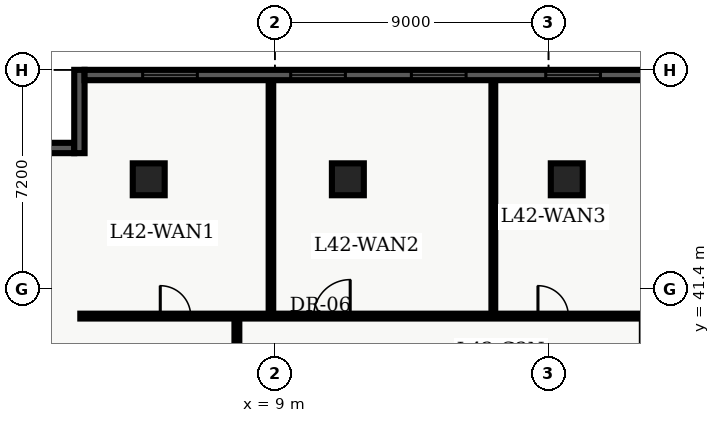
"""IFC4 building model, lengths in metres.
Left out: names, types, materials, properties, quantities, classifications, styles, units other than length and angle.
Written with IfcOpenShell. Run it as: python <this file> out.ifc"""

import sys

from ifc_helpers import new_model, entity, si_unit, converted_unit, direction, frame, origin_with_axes, origin_2d_with_axis, place, context, subcontext, project, spatial, polyline, rectangle, outline, extrude, element, fill, save


model = new_model("IFC4")
c1 = context("Model", 3, precision=1e-05, world=origin_with_axes(), true_north=direction((0.0, 1.0)))
c2 = subcontext(c1, "Body", "Model", "MODEL_VIEW")
j1 = project(units=[si_unit("LENGTHUNIT", "METRE"), converted_unit("PLANEANGLEUNIT", "DEGREE", entity("IfcPlaneAngleMeasure", 0.017), si_unit("PLANEANGLEUNIT", "RADIAN"), dimensions=[0, 0, 0, 0, 0, 0, 0])], contexts=[c1])
p1 = place(None, origin_with_axes())
s1 = spatial("IfcSite", under=j1, at=p1, CompositionType="ELEMENT")
p2 = place(p1, origin_with_axes())
s2 = spatial("IfcBuilding", under=s1, at=p2, CompositionType="ELEMENT")
p3 = place(p2, frame((0.0, 0.0, 171.9), z_axis=(0.0, 0.0, 1.0), x_axis=(1.0, 0.0, 0.0)))
s3 = spatial("IfcBuildingStorey", under=s2, at=p3, CompositionType="ELEMENT", Elevation=171.9)
for number, where, z_axis, x_axis in (
    (1, (11.4, 45.0, 0.0), (0.0, 0.0, 1.0), (1.0, 0.0, 0.0)),
    (2, (18.6, 45.0, 0.0), (0.0, 0.0, 1.0), (1.0, 0.0, 0.0)),
    (3, (4.85, 45.0, 0.0), (0.0, 0.0, 1.0), (1.0, 0.0, 0.0)),
):
    element("IfcColumn", number, at=place(p3, frame(where, z_axis=z_axis, x_axis=x_axis)), inside=s3, PredefinedType="COLUMN", context=c2, shape_type="SweptSolid", body=[
        extrude(rectangle(XDim=1.05, YDim=1.05, at=origin_2d_with_axis()), origin_with_axes(), (0.0, 0.0, 1.0), 3.9),
    ])
p4 = place(p3, frame((2.6, 40.5, 0.0), z_axis=(0.0, 0.0, 1.0), x_axis=(1.0, 0.0, 0.0)))
e4 = element("IfcWall", 4, at=p4, inside=s3, PredefinedType="PARTITIONING", context=c2, shape_type="SweptSolid", body=[
    extrude(outline(polyline([(0.0, -0.08), (21.803, -0.08), (21.803, 0.08), (0.0, 0.08), (0.0, -0.08)])), origin_with_axes(), (0.0, 0.0, 1.0), 2.7),
])
p5 = place(p4, frame((3.13, 0.0, 0.0), z_axis=(0.0, 0.0, 1.0), x_axis=(1.0, 0.0, 0.0)))
e5 = element("IfcOpeningElement", 5, at=p5, cuts=e4, PredefinedType="OPENING", context=c2, shape_type="SweptSolid", body=[
    extrude(rectangle(XDim=1.0, YDim=0.18, at=origin_2d_with_axis()), origin_with_axes(), (0.0, 0.0, 1.0), 2.15),
])
p6 = place(p4, frame((8.277, 0.0, 0.0), z_axis=(0.0, 0.0, 1.0), x_axis=(1.0, 0.0, 0.0)))
e6 = element("IfcOpeningElement", 6, at=p6, cuts=e4, PredefinedType="OPENING", context=c2, shape_type="SweptSolid", body=[
    extrude(rectangle(XDim=1.2, YDim=0.18, at=origin_2d_with_axis()), origin_with_axes(), (0.0, 0.0, 1.0), 2.2),
])
p7 = place(p4, frame((15.553, 0.0, 0.0), z_axis=(0.0, 0.0, 1.0), x_axis=(1.0, 0.0, 0.0)))
e7 = element("IfcOpeningElement", 7, at=p7, cuts=e4, PredefinedType="OPENING", context=c2, shape_type="SweptSolid", body=[
    extrude(rectangle(XDim=1.0, YDim=0.18, at=origin_2d_with_axis()), origin_with_axes(), (0.0, 0.0, 1.0), 2.15),
])
p8 = place(p3, frame((7.75, 7.8, 0.0), z_axis=(0.0, 0.0, 1.0), x_axis=(0.0, 1.0, 0.0)))
e8 = element("IfcWall", 8, at=p8, inside=s3, PredefinedType="PARTITIONING", context=c2, shape_type="SweptSolid", body=[
    extrude(outline(polyline([(0.0, -0.08), (32.7, -0.08), (32.7, 0.08), (0.0, 0.08), (0.0, -0.08)])), origin_with_axes(), (0.0, 0.0, 1.0), 2.7),
])
p9 = place(p8, frame((4.258, 0.0, 0.0), z_axis=(0.0, 0.0, 1.0), x_axis=(1.0, 0.0, 0.0)))
e9 = element("IfcOpeningElement", 9, at=p9, cuts=e8, PredefinedType="OPENING", context=c2, shape_type="SweptSolid", body=[
    extrude(rectangle(XDim=1.0, YDim=0.18, at=origin_2d_with_axis()), origin_with_axes(), (0.0, 0.0, 1.0), 2.15),
])
p10 = place(p8, frame((13.551, 0.0, 0.0), z_axis=(0.0, 0.0, 1.0), x_axis=(1.0, 0.0, 0.0)))
e10 = element("IfcOpeningElement", 10, at=p10, cuts=e8, PredefinedType="OPENING", context=c2, shape_type="SweptSolid", body=[
    extrude(rectangle(XDim=1.0, YDim=0.18, at=origin_2d_with_axis()), origin_with_axes(), (0.0, 0.0, 1.0), 2.15),
])
p11 = place(p8, frame((25.643, 0.0, 0.0), z_axis=(0.0, 0.0, 1.0), x_axis=(1.0, 0.0, 0.0)))
e11 = element("IfcOpeningElement", 11, at=p11, cuts=e8, PredefinedType="OPENING", context=c2, shape_type="SweptSolid", body=[
    extrude(rectangle(XDim=1.0, YDim=0.18, at=origin_2d_with_axis()), origin_with_axes(), (0.0, 0.0, 1.0), 2.15),
])
p12 = place(p3, frame((8.87, 40.6, 0.0), z_axis=(0.0, 0.0, 1.0), x_axis=(0.0, 1.0, 0.0)))
e12 = element("IfcWall", 12, at=p12, inside=s3, PredefinedType="PARTITIONING", context=c2, shape_type="SweptSolid", body=[
    extrude(outline(polyline([(0.0, -0.075), (7.665, -0.075), (7.665, 0.075), (0.0, 0.075), (0.0, -0.075)])), origin_with_axes(), (0.0, 0.0, 1.0), 2.7),
])
p13 = place(p3, frame((16.185, 40.6, 0.0), z_axis=(0.0, 0.0, 1.0), x_axis=(0.0, 1.0, 0.0)))
e13 = element("IfcWall", 13, at=p13, inside=s3, PredefinedType="PARTITIONING", context=c2, shape_type="SweptSolid", body=[
    extrude(outline(polyline([(0.0, -0.062), (7.665, -0.062), (7.665, 0.062), (0.0, 0.062), (0.0, -0.062)])), origin_with_axes(), (0.0, 0.0, 1.0), 2.7),
])
p14 = place(p3, frame((0.34, 46.03, 0.0), z_axis=(0.0, 0.0, 1.0), x_axis=(1.0, 0.0, 0.0)))
e14 = element("IfcWall", 14, at=p14, inside=s3, PredefinedType="SOLIDWALL", context=c2, shape_type="SweptSolid", body=[
    extrude(outline(polyline([(0.0, -0.17), (2.06, -0.17), (2.06, 0.17), (0.0, 0.17), (0.0, -0.17)])), origin_with_axes(), (0.0, 0.0, 1.0), 3.66),
])
p15 = place(p3, frame((2.57, 45.86, 0.0), z_axis=(0.0, 0.0, 1.0), x_axis=(0.0, 1.0, 0.0)))
e15 = element("IfcWall", 15, at=p15, inside=s3, PredefinedType="SOLIDWALL", context=c2, shape_type="SweptSolid", body=[
    extrude(outline(polyline([(0.0, -0.17), (2.74, -0.17), (2.74, 0.17), (0.0, 0.17), (0.0, -0.17)])), origin_with_axes(), (0.0, 0.0, 1.0), 3.66),
])
p16 = place(p3, frame((2.74, 48.43, 0.0), z_axis=(0.0, 0.0, 1.0), x_axis=(1.0, 0.0, 0.0)))
e16 = element("IfcWall", 16, at=p16, inside=s3, PredefinedType="SOLIDWALL", context=c2, shape_type="SweptSolid", body=[
    extrude(outline(polyline([(0.0, -0.17), (18.878, -0.17), (18.878, 0.17), (0.0, 0.17), (0.0, -0.17)])), origin_with_axes(), (0.0, 0.0, 1.0), 3.66),
])
p17 = place(p16, frame((2.81, 0.0, 0.45), z_axis=(0.0, 0.0, 1.0), x_axis=(1.0, 0.0, 0.0)))
e17 = element("IfcOpeningElement", 17, at=p17, cuts=e16, PredefinedType="OPENING", context=c2, shape_type="SweptSolid", body=[
    extrude(rectangle(XDim=1.8, YDim=0.36, at=origin_2d_with_axis()), origin_with_axes(), (0.0, 0.0, 1.0), 2.1),
])
p18 = place(p16, frame((7.679, 0.0, 0.45), z_axis=(0.0, 0.0, 1.0), x_axis=(1.0, 0.0, 0.0)))
e18 = element("IfcOpeningElement", 18, at=p18, cuts=e16, PredefinedType="OPENING", context=c2, shape_type="SweptSolid", body=[
    extrude(rectangle(XDim=1.8, YDim=0.36, at=origin_2d_with_axis()), origin_with_axes(), (0.0, 0.0, 1.0), 2.1),
])
p19 = place(p16, frame((11.649, 0.0, 0.45), z_axis=(0.0, 0.0, 1.0), x_axis=(1.0, 0.0, 0.0)))
e19 = element("IfcOpeningElement", 19, at=p19, cuts=e16, PredefinedType="OPENING", context=c2, shape_type="SweptSolid", body=[
    extrude(rectangle(XDim=1.8, YDim=0.36, at=origin_2d_with_axis()), origin_with_axes(), (0.0, 0.0, 1.0), 2.1),
])
p20 = place(p16, frame((16.068, 0.0, 0.45), z_axis=(0.0, 0.0, 1.0), x_axis=(1.0, 0.0, 0.0)))
e20 = element("IfcOpeningElement", 20, at=p20, cuts=e16, PredefinedType="OPENING", context=c2, shape_type="SweptSolid", body=[
    extrude(rectangle(XDim=1.8, YDim=0.36, at=origin_2d_with_axis()), origin_with_axes(), (0.0, 0.0, 1.0), 2.1),
])
p21 = place(p4, frame((3.13, 0.0, 0.0), z_axis=(0.0, 0.0, 1.0), x_axis=(1.0, 0.0, 0.0)))
e21 = element("IfcDoor", 21, at=p21, inside=s3, OperationType="SINGLE_SWING_LEFT", PredefinedType="DOOR", context=c2, shape_type="SweptSolid", body=[
    extrude(rectangle(XDim=1.0, YDim=0.09, at=origin_2d_with_axis()), origin_with_axes(), (0.0, 0.0, 1.0), 2.15),
])
fill(e5, e21)
p22 = place(p4, frame((8.277, 0.0, 0.0), z_axis=(0.0, 0.0, 1.0), x_axis=(1.0, 0.0, 0.0)))
e22 = element("IfcDoor", 22, at=p22, inside=s3, OperationType="SINGLE_SWING_RIGHT", PredefinedType="DOOR", context=c2, shape_type="SweptSolid", body=[
    extrude(rectangle(XDim=1.2, YDim=0.09, at=origin_2d_with_axis()), origin_with_axes(), (0.0, 0.0, 1.0), 2.2),
])
fill(e6, e22)
p23 = place(p4, frame((15.553, 0.0, 0.0), z_axis=(0.0, 0.0, 1.0), x_axis=(1.0, 0.0, 0.0)))
e23 = element("IfcDoor", 23, at=p23, inside=s3, OperationType="SINGLE_SWING_LEFT", PredefinedType="DOOR", context=c2, shape_type="SweptSolid", body=[
    extrude(rectangle(XDim=1.0, YDim=0.09, at=origin_2d_with_axis()), origin_with_axes(), (0.0, 0.0, 1.0), 2.15),
])
fill(e7, e23)
p24 = place(p16, frame((2.81, 0.0, 0.45), z_axis=(0.0, 0.0, 1.0), x_axis=(1.0, 0.0, 0.0)))
e24 = element("IfcWindow", 24, at=p24, inside=s3, PredefinedType="WINDOW", context=c2, shape_type="SweptSolid", body=[
    extrude(rectangle(XDim=1.8, YDim=0.09, at=origin_2d_with_axis()), origin_with_axes(), (0.0, 0.0, 1.0), 2.1),
])
fill(e17, e24)
p25 = place(p16, frame((7.679, 0.0, 0.45), z_axis=(0.0, 0.0, 1.0), x_axis=(1.0, 0.0, 0.0)))
e25 = element("IfcWindow", 25, at=p25, inside=s3, PredefinedType="WINDOW", context=c2, shape_type="SweptSolid", body=[
    extrude(rectangle(XDim=1.8, YDim=0.09, at=origin_2d_with_axis()), origin_with_axes(), (0.0, 0.0, 1.0), 2.1),
])
fill(e18, e25)
p26 = place(p16, frame((11.649, 0.0, 0.45), z_axis=(0.0, 0.0, 1.0), x_axis=(1.0, 0.0, 0.0)))
e26 = element("IfcWindow", 26, at=p26, inside=s3, PredefinedType="WINDOW", context=c2, shape_type="SweptSolid", body=[
    extrude(rectangle(XDim=1.8, YDim=0.09, at=origin_2d_with_axis()), origin_with_axes(), (0.0, 0.0, 1.0), 2.1),
])
fill(e19, e26)
p27 = place(p16, frame((16.068, 0.0, 0.45), z_axis=(0.0, 0.0, 1.0), x_axis=(1.0, 0.0, 0.0)))
e27 = element("IfcWindow", 27, at=p27, inside=s3, PredefinedType="WINDOW", context=c2, shape_type="SweptSolid", body=[
    extrude(rectangle(XDim=1.8, YDim=0.09, at=origin_2d_with_axis()), origin_with_axes(), (0.0, 0.0, 1.0), 2.1),
])
fill(e20, e27)
save(model, sys.argv[1])
